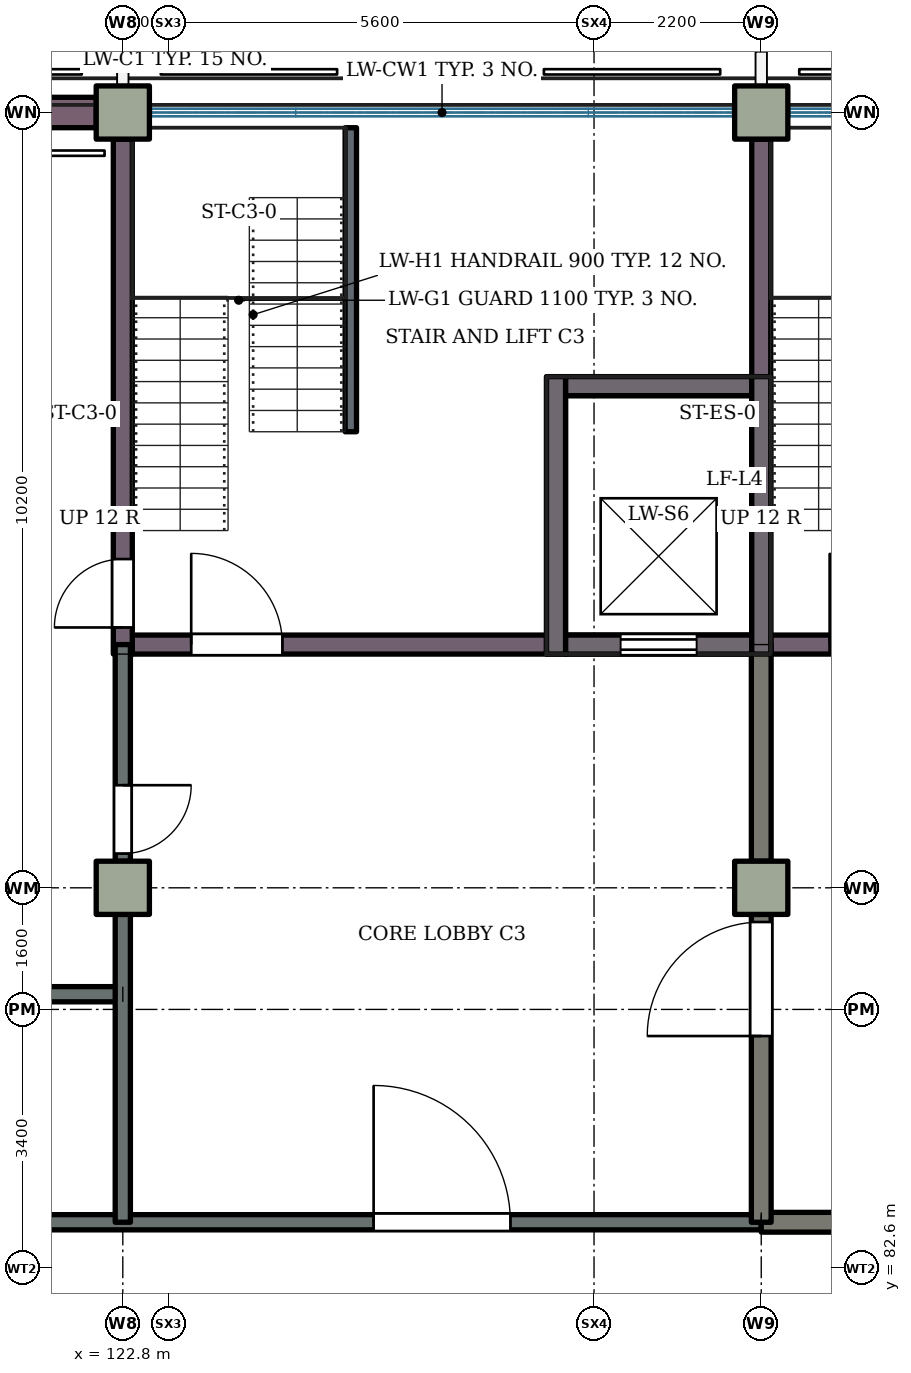
"""IFC4 building model, lengths in metres.
Left out: names, types, materials, properties, quantities, classifications, styles, units other than length and angle.
Written with IfcOpenShell. Run it as: python <this file> out.ifc"""

import sys

from ifc_helpers import new_model, si_unit, direction, frame, frame_2d, origin, origin_2d, place, context, subcontext, project, spatial, rectangle, extrude, element, fill, save


model = new_model("IFC4")
c1 = context("Model", 3, precision=1e-05, world=origin(), true_north=direction((0.0, 1.0)))
c2 = subcontext(c1, "Body", "Model", "MODEL_VIEW")
j1 = project(units=[si_unit("LENGTHUNIT", "METRE"), si_unit("PLANEANGLEUNIT", "RADIAN")], contexts=[c1])
p1 = place(None, origin())
s1 = spatial("IfcSite", under=j1, at=p1, CompositionType="ELEMENT")
p2 = place(p1, origin())
s2 = spatial("IfcBuilding", under=s1, at=p2, CompositionType="ELEMENT")
p3 = place(p2, origin())
s3 = spatial("IfcBuildingStorey", under=s2, at=p3, CompositionType="ELEMENT", Elevation=0.0)
for number, where, z_axis, x_axis in (
    (1, (122.8, 87.6, 0.0), (0.0, 0.0, 1.0), (1.0, 0.0, 0.0)),
    (2, (131.2, 87.6, 0.0), (0.0, 0.0, 1.0), (1.0, 0.0, 0.0)),
    (3, (122.8, 97.8, 0.0), (0.0, 0.0, 1.0), (1.0, 0.0, 0.0)),
    (4, (131.2, 97.8, 0.0), (0.0, 0.0, 1.0), (1.0, 0.0, 0.0)),
):
    element("IfcColumn", number, at=place(p3, frame(where, z_axis=z_axis, x_axis=x_axis)), inside=s3, PredefinedType="COLUMN", context=c2, shape_type="SweptSolid", body=[
        extrude(rectangle(XDim=0.7, YDim=0.7, at=origin_2d()), origin(), (0.0, 0.0, 1.0), 4.2),
    ])
p4 = place(p3, frame((122.925, 90.8, 0.0), z_axis=(0.0, 0.0, 1.0), x_axis=(1.0, 0.0, 0.0)))
e5 = element("IfcWall", 5, at=p4, inside=s3, PredefinedType="SHEAR", context=c2, shape_type="SweptSolid", body=[
    extrude(rectangle(XDim=5.45, YDim=0.25, at=frame_2d((2.725, 0.0))), origin(), (0.0, 0.0, 1.0), 4.2),
])
p5 = place(p4, frame((0.775, 0.0, 0.0)))
e6 = element("IfcOpeningElement", 6, at=p5, cuts=e5, PredefinedType="OPENING", context=c2, shape_type="SweptSolid", body=[
    extrude(rectangle(XDim=1.2, YDim=2.1, at=frame_2d((0.6, 1.05))), frame((0.0, 0.135, 0.0), z_axis=(0.0, -1.0, 0.0), x_axis=(1.0, 0.0, 0.0)), (0.0, 0.0, 1.0), 0.27),
])
p6 = place(p3, frame((128.625, 90.8, 0.0), z_axis=(0.0, 0.0, 1.0), x_axis=(1.0, 0.0, 0.0)))
e7 = element("IfcWall", 7, at=p6, inside=s3, PredefinedType="SHEAR", context=c2, shape_type="SweptSolid", body=[
    extrude(rectangle(XDim=2.45, YDim=0.25, at=frame_2d((1.225, 0.0))), origin(), (0.0, 0.0, 1.0), 4.2),
])
p7 = place(p6, frame((0.725, 0.0, 0.0)))
e8 = element("IfcOpeningElement", 8, at=p7, cuts=e7, PredefinedType="OPENING", context=c2, shape_type="SweptSolid", body=[
    extrude(rectangle(XDim=1.0, YDim=2.1, at=frame_2d((0.5, 1.05))), frame((0.0, 0.135, 0.0), z_axis=(0.0, -1.0, 0.0), x_axis=(1.0, 0.0, 0.0)), (0.0, 0.0, 1.0), 0.27),
])
p8 = place(p3, frame((131.325, 90.8, 0.0), z_axis=(0.0, 0.0, 1.0), x_axis=(1.0, 0.0, 0.0)))
e9 = element("IfcWall", 9, at=p8, inside=s3, PredefinedType="SHEAR", context=c2, shape_type="SweptSolid", body=[
    extrude(rectangle(XDim=7.925, YDim=0.25, at=frame_2d((3.962, 0.0))), origin(), (0.0, 0.0, 1.0), 4.2),
])
p9 = place(p8, frame((3.325, 0.0, 0.0)))
e10 = element("IfcOpeningElement", 10, at=p9, cuts=e9, PredefinedType="OPENING", context=c2, shape_type="SweptSolid", body=[
    extrude(rectangle(XDim=1.5, YDim=2.1, at=frame_2d((0.75, 1.05))), frame((0.0, 0.135, 0.0), z_axis=(0.0, -1.0, 0.0), x_axis=(1.0, 0.0, 0.0)), (0.0, 0.0, 1.0), 0.27),
])
p10 = place(p8, frame((0.775, 0.0, 0.0)))
e11 = element("IfcOpeningElement", 11, at=p10, cuts=e9, PredefinedType="OPENING", context=c2, shape_type="SweptSolid", body=[
    extrude(rectangle(XDim=1.2, YDim=2.1, at=frame_2d((0.6, 1.05))), frame((0.0, 0.135, 0.0), z_axis=(0.0, -1.0, 0.0), x_axis=(1.0, 0.0, 0.0)), (0.0, 0.0, 1.0), 0.27),
])
p11 = place(p3, frame((128.625, 94.2, 0.0), z_axis=(0.0, 0.0, 1.0), x_axis=(1.0, 0.0, 0.0)))
e12 = element("IfcWall", 12, at=p11, inside=s3, PredefinedType="SHEAR", context=c2, shape_type="SweptSolid", body=[
    extrude(rectangle(XDim=2.45, YDim=0.25, at=frame_2d((1.225, 0.0))), origin(), (0.0, 0.0, 1.0), 4.2),
])
p12 = place(p3, frame((122.8, 90.675, 0.0), z_axis=(0.0, 0.0, 1.0), x_axis=(0.0, 1.0, 0.0)))
e13 = element("IfcWall", 13, at=p12, inside=s3, PredefinedType="SHEAR", context=c2, shape_type="SweptSolid", body=[
    extrude(rectangle(XDim=6.775, YDim=0.25, at=frame_2d((3.387, 0.0))), origin(), (0.0, 0.0, 1.0), 4.2),
])
p13 = place(p12, frame((0.35, 0.0, 0.0)))
e14 = element("IfcOpeningElement", 14, at=p13, cuts=e13, PredefinedType="OPENING", context=c2, shape_type="SweptSolid", body=[
    extrude(rectangle(XDim=0.9, YDim=2.1, at=frame_2d((0.45, 1.05))), frame((0.0, 0.135, 0.0), z_axis=(0.0, -1.0, 0.0), x_axis=(1.0, 0.0, 0.0)), (0.0, 0.0, 1.0), 0.27),
])
p14 = place(p3, frame((128.5, 90.675, 0.0), z_axis=(0.0, 0.0, 1.0), x_axis=(0.0, 1.0, 0.0)))
e15 = element("IfcWall", 15, at=p14, inside=s3, PredefinedType="SHEAR", context=c2, shape_type="SweptSolid", body=[
    extrude(rectangle(XDim=3.65, YDim=0.25, at=frame_2d((1.825, 0.0))), origin(), (0.0, 0.0, 1.0), 4.2),
])
p15 = place(p3, frame((131.2, 90.675, 0.0), z_axis=(0.0, 0.0, 1.0), x_axis=(0.0, 1.0, 0.0)))
e16 = element("IfcWall", 16, at=p15, inside=s3, PredefinedType="SHEAR", context=c2, shape_type="SweptSolid", body=[
    extrude(rectangle(XDim=6.775, YDim=0.25, at=frame_2d((3.387, 0.0))), origin(), (0.0, 0.0, 1.0), 4.2),
])
p16 = place(p3, frame((114.75, 97.8, 0.0), z_axis=(0.0, 0.0, 1.0), x_axis=(1.0, 0.0, 0.0)))
e17 = element("IfcWall", 17, at=p16, inside=s3, PredefinedType="SOLIDWALL", context=c2, shape_type="SweptSolid", body=[
    extrude(rectangle(XDim=7.7, YDim=0.4, at=frame_2d((3.85, 0.0))), origin(), (0.0, 0.0, 1.0), 3.32),
])
p17 = place(p16, frame((0.75, 0.0, 2.1)))
e18 = element("IfcOpeningElement", 18, at=p17, cuts=e17, PredefinedType="OPENING", context=c2, shape_type="SweptSolid", body=[
    extrude(rectangle(XDim=0.6, YDim=0.9, at=frame_2d((0.3, 0.45))), frame((0.0, 0.21, 0.0), z_axis=(0.0, -1.0, 0.0), x_axis=(1.0, 0.0, 0.0)), (0.0, 0.0, 1.0), 0.42),
])
p18 = place(p16, frame((6.35, 0.0, 2.1)))
e19 = element("IfcOpeningElement", 19, at=p18, cuts=e17, PredefinedType="OPENING", context=c2, shape_type="SweptSolid", body=[
    extrude(rectangle(XDim=0.6, YDim=0.9, at=frame_2d((0.3, 0.45))), frame((0.0, 0.21, 0.0), z_axis=(0.0, -1.0, 0.0), x_axis=(1.0, 0.0, 0.0)), (0.0, 0.0, 1.0), 0.42),
])
p19 = place(p3, frame((97.6, 83.2, 0.0), z_axis=(0.0, 0.0, 1.0), x_axis=(1.0, 0.0, 0.0)))
e20 = element("IfcWall", 20, at=p19, inside=s3, PredefinedType="PARTITIONING", context=c2, shape_type="SweptSolid", body=[
    extrude(rectangle(XDim=33.6, YDim=0.2, at=frame_2d((16.8, 0.0))), origin(), (0.0, 0.0, 1.0), 3.92),
])
p20 = place(p19, frame((3.3, 0.0, 0.0)))
e21 = element("IfcOpeningElement", 21, at=p20, cuts=e20, PredefinedType="OPENING", context=c2, shape_type="SweptSolid", body=[
    extrude(rectangle(XDim=1.8, YDim=2.1, at=frame_2d((0.9, 1.05))), frame((0.0, 0.11, 0.0), z_axis=(0.0, -1.0, 0.0), x_axis=(1.0, 0.0, 0.0)), (0.0, 0.0, 1.0), 0.22),
])
p21 = place(p19, frame((11.7, 0.0, 0.0)))
e22 = element("IfcOpeningElement", 22, at=p21, cuts=e20, PredefinedType="OPENING", context=c2, shape_type="SweptSolid", body=[
    extrude(rectangle(XDim=1.8, YDim=2.1, at=frame_2d((0.9, 1.05))), frame((0.0, 0.11, 0.0), z_axis=(0.0, -1.0, 0.0), x_axis=(1.0, 0.0, 0.0)), (0.0, 0.0, 1.0), 0.22),
])
p22 = place(p19, frame((20.1, 0.0, 0.0)))
e23 = element("IfcOpeningElement", 23, at=p22, cuts=e20, PredefinedType="OPENING", context=c2, shape_type="SweptSolid", body=[
    extrude(rectangle(XDim=1.8, YDim=2.1, at=frame_2d((0.9, 1.05))), frame((0.0, 0.11, 0.0), z_axis=(0.0, -1.0, 0.0), x_axis=(1.0, 0.0, 0.0)), (0.0, 0.0, 1.0), 0.22),
])
p23 = place(p19, frame((28.5, 0.0, 0.0)))
e24 = element("IfcOpeningElement", 24, at=p23, cuts=e20, PredefinedType="OPENING", context=c2, shape_type="SweptSolid", body=[
    extrude(rectangle(XDim=1.8, YDim=2.1, at=frame_2d((0.9, 1.05))), frame((0.0, 0.11, 0.0), z_axis=(0.0, -1.0, 0.0), x_axis=(1.0, 0.0, 0.0)), (0.0, 0.0, 1.0), 0.22),
])
p24 = place(p3, frame((131.2, 83.2, 0.0), z_axis=(0.0, 0.0, 1.0), x_axis=(1.0, 0.0, 0.0)))
e25 = element("IfcWall", 25, at=p24, inside=s3, PredefinedType="PARTITIONING", context=c2, shape_type="SweptSolid", body=[
    extrude(rectangle(XDim=8.05, YDim=0.26, at=frame_2d((4.025, 0.0))), origin(), (0.0, 0.0, 1.0), 3.92),
])
p25 = place(p24, frame((3.45, 0.0, 0.0)))
e26 = element("IfcOpeningElement", 26, at=p25, cuts=e25, PredefinedType="OPENING", context=c2, shape_type="SweptSolid", body=[
    extrude(rectangle(XDim=1.5, YDim=2.1, at=frame_2d((0.75, 1.05))), frame((0.0, 0.14, 0.0), z_axis=(0.0, -1.0, 0.0), x_axis=(1.0, 0.0, 0.0)), (0.0, 0.0, 1.0), 0.28),
])
p26 = place(p3, frame((114.4, 86.2, 0.0), z_axis=(0.0, 0.0, 1.0), x_axis=(1.0, 0.0, 0.0)))
e27 = element("IfcWall", 27, at=p26, inside=s3, PredefinedType="PARTITIONING", context=c2, shape_type="SweptSolid", body=[
    extrude(rectangle(XDim=8.4, YDim=0.2, at=frame_2d((4.2, 0.0))), origin(), (0.0, 0.0, 1.0), 3.92),
])
p27 = place(p26, frame((1.65, 0.0, 0.0)))
e28 = element("IfcOpeningElement", 28, at=p27, cuts=e27, PredefinedType="OPENING", context=c2, shape_type="SweptSolid", body=[
    extrude(rectangle(XDim=0.9, YDim=2.1, at=frame_2d((0.45, 1.05))), frame((0.0, 0.11, 0.0), z_axis=(0.0, -1.0, 0.0), x_axis=(1.0, 0.0, 0.0)), (0.0, 0.0, 1.0), 0.22),
])
p28 = place(p26, frame((4.35, 0.0, 0.0)))
e29 = element("IfcOpeningElement", 29, at=p28, cuts=e27, PredefinedType="OPENING", context=c2, shape_type="SweptSolid", body=[
    extrude(rectangle(XDim=0.9, YDim=2.1, at=frame_2d((0.45, 1.05))), frame((0.0, 0.11, 0.0), z_axis=(0.0, -1.0, 0.0), x_axis=(1.0, 0.0, 0.0)), (0.0, 0.0, 1.0), 0.22),
])
p29 = place(p3, frame((122.8, 83.2, 0.0), z_axis=(0.0, 0.0, 1.0), x_axis=(0.0, 1.0, 0.0)))
e30 = element("IfcWall", 30, at=p29, inside=s3, PredefinedType="PARTITIONING", context=c2, shape_type="SweptSolid", body=[
    extrude(rectangle(XDim=4.05, YDim=0.2, at=frame_2d((2.025, 0.0))), origin(), (0.0, 0.0, 1.0), 3.02),
])
p30 = place(p3, frame((122.8, 87.95, 0.0), z_axis=(0.0, 0.0, 1.0), x_axis=(0.0, 1.0, 0.0)))
e31 = element("IfcWall", 31, at=p30, inside=s3, PredefinedType="PARTITIONING", context=c2, shape_type="SweptSolid", body=[
    extrude(rectangle(XDim=2.85, YDim=0.2, at=frame_2d((1.425, 0.0))), origin(), (0.0, 0.0, 1.0), 3.02),
])
p31 = place(p30, frame((0.1, 0.0, 0.0)))
e32 = element("IfcOpeningElement", 32, at=p31, cuts=e31, PredefinedType="OPENING", context=c2, shape_type="SweptSolid", body=[
    extrude(rectangle(XDim=0.9, YDim=2.1, at=frame_2d((0.45, 1.05))), frame((0.0, 0.11, 0.0), z_axis=(0.0, -1.0, 0.0), x_axis=(1.0, 0.0, 0.0)), (0.0, 0.0, 1.0), 0.22),
])
p32 = place(p3, frame((131.2, 83.2, 0.0), z_axis=(0.0, 0.0, 1.0), x_axis=(0.0, 1.0, 0.0)))
e33 = element("IfcWall", 33, at=p32, inside=s3, PredefinedType="PARTITIONING", context=c2, shape_type="SweptSolid", body=[
    extrude(rectangle(XDim=4.05, YDim=0.26, at=frame_2d((2.025, 0.0))), origin(), (0.0, 0.0, 1.0), 3.02),
])
p33 = place(p32, frame((2.45, 0.0, 0.0)))
e34 = element("IfcOpeningElement", 34, at=p33, cuts=e33, PredefinedType="OPENING", context=c2, shape_type="SweptSolid", body=[
    extrude(rectangle(XDim=1.5, YDim=2.1, at=frame_2d((0.75, 1.05))), frame((0.0, 0.14, 0.0), z_axis=(0.0, -1.0, 0.0), x_axis=(1.0, 0.0, 0.0)), (0.0, 0.0, 1.0), 0.28),
])
p34 = place(p3, frame((131.2, 87.95, 0.0), z_axis=(0.0, 0.0, 1.0), x_axis=(0.0, 1.0, 0.0)))
e35 = element("IfcWall", 35, at=p34, inside=s3, PredefinedType="PARTITIONING", context=c2, shape_type="SweptSolid", body=[
    extrude(rectangle(XDim=2.85, YDim=0.26, at=frame_2d((1.425, 0.0))), origin(), (0.0, 0.0, 1.0), 3.02),
])
p35 = place(p3, frame((125.8, 93.6, 0.0), z_axis=(0.0, 0.0, 1.0), x_axis=(0.0, 1.0, 0.0)))
e36 = element("IfcWall", 36, at=p35, inside=s3, PredefinedType="PARTITIONING", context=c2, shape_type="SweptSolid", body=[
    extrude(rectangle(XDim=4.0, YDim=0.15, at=frame_2d((2.0, 0.0))), origin(), (0.0, 0.0, 1.0), 3.92),
])
for number, where, z_axis, x_axis in (
    (37, (128.625, 90.8, -1.2), (0.0, 0.0, 1.0), (1.0, 0.0, 0.0)),
    (38, (128.625, 94.2, -1.2), (0.0, 0.0, 1.0), (1.0, 0.0, 0.0)),
):
    element("IfcWall", number, at=place(p3, frame(where, z_axis=z_axis, x_axis=x_axis)), inside=s3, PredefinedType="SOLIDWALL", context=c2, shape_type="SweptSolid", body=[
        extrude(rectangle(XDim=2.45, YDim=0.25, at=frame_2d((1.225, 0.0))), origin(), (0.0, 0.0, 1.0), 1.2),
    ])
for number, where, z_axis, x_axis in (
    (39, (128.5, 90.675, -1.2), (0.0, 0.0, 1.0), (0.0, 1.0, 0.0)),
    (40, (131.2, 90.675, -1.2), (0.0, 0.0, 1.0), (0.0, 1.0, 0.0)),
):
    element("IfcWall", number, at=place(p3, frame(where, z_axis=z_axis, x_axis=x_axis)), inside=s3, PredefinedType="SOLIDWALL", context=c2, shape_type="SweptSolid", body=[
        extrude(rectangle(XDim=3.65, YDim=0.25, at=frame_2d((1.825, 0.0))), origin(), (0.0, 0.0, 1.0), 1.2),
    ])
p36 = place(p31, origin())
e41 = element("IfcDoor", 41, at=p36, inside=s3, OperationType="SINGLE_SWING_RIGHT", PredefinedType="DOOR", context=c2, shape_type="SweptSolid", body=[
    extrude(rectangle(XDim=0.9, YDim=2.1, at=frame_2d((0.45, 1.05))), frame((0.0, 0.025, 0.0), z_axis=(0.0, -1.0, 0.0), x_axis=(1.0, 0.0, 0.0)), (0.0, 0.0, 1.0), 0.05),
])
fill(e32, e41)
p37 = place(p13, origin())
e42 = element("IfcDoor", 42, at=p37, inside=s3, OperationType="SINGLE_SWING_LEFT", PredefinedType="DOOR", context=c2, shape_type="SweptSolid", body=[
    extrude(rectangle(XDim=0.9, YDim=2.1, at=frame_2d((0.45, 1.05))), frame((0.0, 0.025, 0.0), z_axis=(0.0, -1.0, 0.0), x_axis=(1.0, 0.0, 0.0)), (0.0, 0.0, 1.0), 0.05),
])
fill(e14, e42)
p38 = place(p33, origin())
e43 = element("IfcDoor", 43, at=p38, inside=s3, OperationType="DOUBLE_DOOR_SINGLE_SWING", PredefinedType="DOOR", context=c2, shape_type="SweptSolid", body=[
    extrude(rectangle(XDim=1.5, YDim=2.1, at=frame_2d((0.75, 1.05))), frame((0.0, 0.025, 0.0), z_axis=(0.0, -1.0, 0.0), x_axis=(1.0, 0.0, 0.0)), (0.0, 0.0, 1.0), 0.05),
])
fill(e34, e43)
p39 = place(p23, origin())
e44 = element("IfcDoor", 44, at=p39, inside=s3, OperationType="DOUBLE_DOOR_SINGLE_SWING", PredefinedType="DOOR", context=c2, shape_type="SweptSolid", body=[
    extrude(rectangle(XDim=1.8, YDim=2.1, at=frame_2d((0.9, 1.05))), frame((0.0, 0.025, 0.0), z_axis=(0.0, -1.0, 0.0), x_axis=(1.0, 0.0, 0.0)), (0.0, 0.0, 1.0), 0.05),
])
fill(e24, e44)
p40 = place(p5, origin())
e45 = element("IfcDoor", 45, at=p40, inside=s3, OperationType="SINGLE_SWING_LEFT", PredefinedType="DOOR", context=c2, shape_type="SweptSolid", body=[
    extrude(rectangle(XDim=1.2, YDim=2.1, at=frame_2d((0.6, 1.05))), frame((0.0, 0.025, 0.0), z_axis=(0.0, -1.0, 0.0), x_axis=(1.0, 0.0, 0.0)), (0.0, 0.0, 1.0), 0.05),
])
fill(e6, e45)
p41 = place(p7, origin())
e46 = element("IfcDoor", 46, at=p41, inside=s3, OperationType="SLIDING_TO_LEFT", PredefinedType="DOOR", context=c2, shape_type="SweptSolid", body=[
    extrude(rectangle(XDim=1.0, YDim=2.1, at=frame_2d((0.5, 1.05))), frame((0.0, 0.025, 0.0), z_axis=(0.0, -1.0, 0.0), x_axis=(1.0, 0.0, 0.0)), (0.0, 0.0, 1.0), 0.05),
])
fill(e8, e46)
p42 = place(p10, origin())
e47 = element("IfcDoor", 47, at=p42, inside=s3, OperationType="SINGLE_SWING_LEFT", PredefinedType="DOOR", context=c2, shape_type="SweptSolid", body=[
    extrude(rectangle(XDim=1.2, YDim=2.1, at=frame_2d((0.6, 1.05))), frame((0.0, 0.025, 0.0), z_axis=(0.0, -1.0, 0.0), x_axis=(1.0, 0.0, 0.0)), (0.0, 0.0, 1.0), 0.05),
])
fill(e11, e47)
save(model, sys.argv[1])
